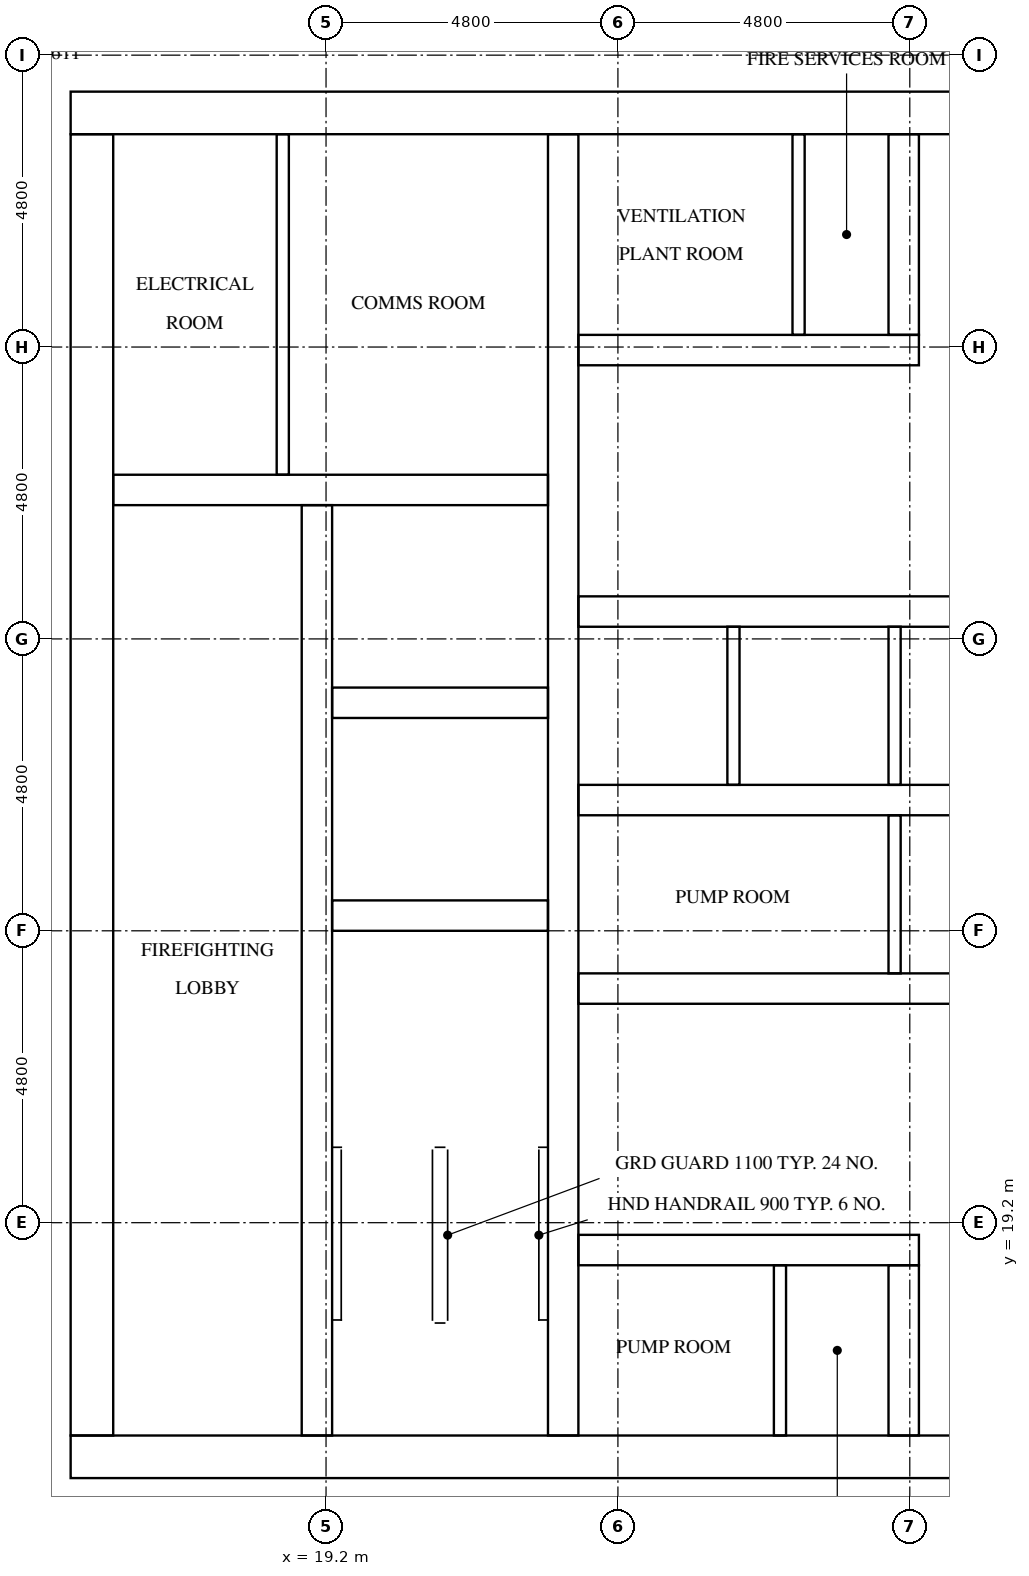
"""IFC4 building model, lengths in metres.
Left out: names, types, materials, properties, quantities, classifications, styles, units other than length and angle.
Written with IfcOpenShell. Run it as: python <this file> out.ifc"""

import sys

from ifc_helpers import new_model, si_unit, direction, frame, frame_2d, origin, place, context, subcontext, project, spatial, rectangle, extrude, element, fill, save


model = new_model("IFC4")
c1 = context("Model", 3, precision=1e-05, world=origin(), true_north=direction((0.0, 1.0)))
c2 = subcontext(c1, "Body", "Model", "MODEL_VIEW")
j1 = project(units=[si_unit("LENGTHUNIT", "METRE"), si_unit("PLANEANGLEUNIT", "RADIAN")], contexts=[c1])
p1 = place(None, origin())
s1 = spatial("IfcSite", under=j1, at=p1, CompositionType="ELEMENT")
p2 = place(p1, origin())
s2 = spatial("IfcBuilding", under=s1, at=p2, CompositionType="ELEMENT")
p3 = place(p2, frame((0.0, 0.0, 215.8)))
s3 = spatial("IfcBuildingStorey", under=s2, at=p3, CompositionType="ELEMENT", Elevation=215.8)
p4 = place(p3, frame((15.0, 15.35, 0.0), z_axis=(0.0, 0.0, 1.0), x_axis=(1.0, 0.0, 0.0)))
e1 = element("IfcWall", 1, at=p4, inside=s3, PredefinedType="SHEAR", context=c2, shape_type="SweptSolid", body=[
    extrude(rectangle(XDim=32.4, YDim=0.7, at=frame_2d((16.2, 0.0))), origin(), (0.0, 0.0, 1.0), 3.2),
])
p5 = place(p4, frame((15.3, 0.0, 0.0)))
e2 = element("IfcOpeningElement", 2, at=p5, cuts=e1, PredefinedType="OPENING", context=c2, shape_type="SweptSolid", body=[
    extrude(rectangle(XDim=1.8, YDim=2.1, at=frame_2d((0.9, 1.05))), frame((0.0, 0.36, 0.0), z_axis=(0.0, -1.0, 0.0), x_axis=(1.0, 0.0, 0.0)), (0.0, 0.0, 1.0), 0.72),
])
p6 = place(p3, frame((15.0, 37.45, 0.0), z_axis=(0.0, 0.0, 1.0), x_axis=(1.0, 0.0, 0.0)))
e3 = element("IfcWall", 3, at=p6, inside=s3, PredefinedType="SHEAR", context=c2, shape_type="SweptSolid", body=[
    extrude(rectangle(XDim=32.4, YDim=0.7, at=frame_2d((16.2, 0.0))), origin(), (0.0, 0.0, 1.0), 3.2),
])
p7 = place(p6, frame((15.3, 0.0, 0.0)))
e4 = element("IfcOpeningElement", 4, at=p7, cuts=e3, PredefinedType="OPENING", context=c2, shape_type="SweptSolid", body=[
    extrude(rectangle(XDim=1.8, YDim=2.1, at=frame_2d((0.9, 1.05))), frame((0.0, 0.36, 0.0), z_axis=(0.0, -1.0, 0.0), x_axis=(1.0, 0.0, 0.0)), (0.0, 0.0, 1.0), 0.72),
])
p8 = place(p6, frame((1.544, 0.0, 0.0)))
e5 = element("IfcOpeningElement", 5, at=p8, cuts=e3, PredefinedType="OPENING", context=c2, shape_type="SweptSolid", body=[
    extrude(rectangle(XDim=1.0, YDim=2.1, at=frame_2d((0.5, 1.05))), frame((0.0, 0.36, 0.0), z_axis=(0.0, -1.0, 0.0), x_axis=(1.0, 0.0, 0.0)), (0.0, 0.0, 1.0), 0.72),
])
p9 = place(p6, frame((5.219, 0.0, 0.0)))
e6 = element("IfcOpeningElement", 6, at=p9, cuts=e3, PredefinedType="OPENING", context=c2, shape_type="SweptSolid", body=[
    extrude(rectangle(XDim=1.0, YDim=2.1, at=frame_2d((0.5, 1.05))), frame((0.0, 0.36, 0.0), z_axis=(0.0, -1.0, 0.0), x_axis=(1.0, 0.0, 0.0)), (0.0, 0.0, 1.0), 0.72),
])
p10 = place(p3, frame((15.35, 15.7, 0.0), z_axis=(0.0, 0.0, 1.0), x_axis=(0.0, 1.0, 0.0)))
e7 = element("IfcWall", 7, at=p10, inside=s3, PredefinedType="SHEAR", context=c2, shape_type="SweptSolid", body=[
    extrude(rectangle(XDim=21.4, YDim=0.7, at=frame_2d((10.7, 0.0))), origin(), (0.0, 0.0, 1.0), 3.2),
])
p11 = place(p10, frame((5.06, 0.0, 0.0)))
e8 = element("IfcOpeningElement", 8, at=p11, cuts=e7, PredefinedType="OPENING", context=c2, shape_type="SweptSolid", body=[
    extrude(rectangle(XDim=1.2, YDim=2.1, at=frame_2d((0.6, 1.05))), frame((0.0, 0.36, 0.0), z_axis=(0.0, -1.0, 0.0), x_axis=(1.0, 0.0, 0.0)), (0.0, 0.0, 1.0), 0.72),
])
p12 = place(p3, frame((19.05, 15.7, 0.0), z_axis=(0.0, 0.0, 1.0), x_axis=(0.0, 1.0, 0.0)))
e9 = element("IfcWall", 9, at=p12, inside=s3, PredefinedType="SHEAR", context=c2, shape_type="SweptSolid", body=[
    extrude(rectangle(XDim=15.3, YDim=0.5, at=frame_2d((7.65, 0.0))), origin(), (0.0, 0.0, 1.0), 3.2),
])
p13 = place(p12, frame((9.75, 0.0, 0.0)))
e10 = element("IfcOpeningElement", 10, at=p13, cuts=e9, PredefinedType="OPENING", context=c2, shape_type="SweptSolid", body=[
    extrude(rectangle(XDim=1.1, YDim=2.1, at=frame_2d((0.55, 1.05))), frame((0.0, 0.26, 0.0), z_axis=(0.0, -1.0, 0.0), x_axis=(1.0, 0.0, 0.0)), (0.0, 0.0, 1.0), 0.52),
])
p14 = place(p12, frame((13.25, 0.0, 0.0)))
e11 = element("IfcOpeningElement", 11, at=p14, cuts=e9, PredefinedType="OPENING", context=c2, shape_type="SweptSolid", body=[
    extrude(rectangle(XDim=1.1, YDim=2.1, at=frame_2d((0.55, 1.05))), frame((0.0, 0.26, 0.0), z_axis=(0.0, -1.0, 0.0), x_axis=(1.0, 0.0, 0.0)), (0.0, 0.0, 1.0), 0.52),
])
p15 = place(p12, frame((0.5, 0.0, 0.0)))
e12 = element("IfcOpeningElement", 12, at=p15, cuts=e9, PredefinedType="OPENING", context=c2, shape_type="SweptSolid", body=[
    extrude(rectangle(XDim=1.2, YDim=2.1, at=frame_2d((0.6, 1.05))), frame((0.0, 0.26, 0.0), z_axis=(0.0, -1.0, 0.0), x_axis=(1.0, 0.0, 0.0)), (0.0, 0.0, 1.0), 0.52),
])
p16 = place(p3, frame((23.1, 15.7, 0.0), z_axis=(0.0, 0.0, 1.0), x_axis=(0.0, 1.0, 0.0)))
e13 = element("IfcWall", 13, at=p16, inside=s3, PredefinedType="SHEAR", context=c2, shape_type="SweptSolid", body=[
    extrude(rectangle(XDim=21.4, YDim=0.5, at=frame_2d((10.7, 0.0))), origin(), (0.0, 0.0, 1.0), 3.2),
])
for number, where, z_axis, x_axis in (
    (14, (19.3, 24.25, 0.0), (0.0, 0.0, 1.0), (1.0, 0.0, 0.0)),
    (15, (19.3, 27.75, 0.0), (0.0, 0.0, 1.0), (1.0, 0.0, 0.0)),
):
    element("IfcWall", number, at=place(p3, frame(where, z_axis=z_axis, x_axis=x_axis)), inside=s3, PredefinedType="SHEAR", context=c2, shape_type="SweptSolid", body=[
        extrude(rectangle(XDim=3.55, YDim=0.5, at=frame_2d((1.775, 0.0))), origin(), (0.0, 0.0, 1.0), 3.2),
    ])
p17 = place(p3, frame((15.7, 31.25, 0.0), z_axis=(0.0, 0.0, 1.0), x_axis=(1.0, 0.0, 0.0)))
e16 = element("IfcWall", 16, at=p17, inside=s3, PredefinedType="SHEAR", context=c2, shape_type="SweptSolid", body=[
    extrude(rectangle(XDim=7.15, YDim=0.5, at=frame_2d((3.575, 0.0))), origin(), (0.0, 0.0, 1.0), 3.2),
])
p18 = place(p3, frame((23.35, 18.75, 0.0), z_axis=(0.0, 0.0, 1.0), x_axis=(1.0, 0.0, 0.0)))
e17 = element("IfcWall", 17, at=p18, inside=s3, PredefinedType="SHEAR", context=c2, shape_type="SweptSolid", body=[
    extrude(rectangle(XDim=5.6, YDim=0.5, at=frame_2d((2.8, 0.0))), origin(), (0.0, 0.0, 1.0), 3.2),
])
p19 = place(p18, frame((1.107, 0.0, 0.0)))
e18 = element("IfcOpeningElement", 18, at=p19, cuts=e17, PredefinedType="OPENING", context=c2, shape_type="SweptSolid", body=[
    extrude(rectangle(XDim=1.0, YDim=2.1, at=frame_2d((0.5, 1.05))), frame((0.0, 0.26, 0.0), z_axis=(0.0, -1.0, 0.0), x_axis=(1.0, 0.0, 0.0)), (0.0, 0.0, 1.0), 0.52),
])
p20 = place(p18, frame((3.758, 0.0, 0.0)))
e19 = element("IfcOpeningElement", 19, at=p20, cuts=e17, PredefinedType="OPENING", context=c2, shape_type="SweptSolid", body=[
    extrude(rectangle(XDim=1.0, YDim=2.1, at=frame_2d((0.5, 1.05))), frame((0.0, 0.26, 0.0), z_axis=(0.0, -1.0, 0.0), x_axis=(1.0, 0.0, 0.0)), (0.0, 0.0, 1.0), 0.52),
])
p21 = place(p3, frame((23.35, 23.05, 0.0), z_axis=(0.0, 0.0, 1.0), x_axis=(1.0, 0.0, 0.0)))
e20 = element("IfcWall", 20, at=p21, inside=s3, PredefinedType="SHEAR", context=c2, shape_type="SweptSolid", body=[
    extrude(rectangle(XDim=15.7, YDim=0.5, at=frame_2d((7.85, 0.0))), origin(), (0.0, 0.0, 1.0), 3.2),
])
p22 = place(p21, frame((2.05, 0.0, 0.0)))
e21 = element("IfcOpeningElement", 21, at=p22, cuts=e20, PredefinedType="OPENING", context=c2, shape_type="SweptSolid", body=[
    extrude(rectangle(XDim=1.0, YDim=2.1, at=frame_2d((0.5, 1.05))), frame((0.0, 0.26, 0.0), z_axis=(0.0, -1.0, 0.0), x_axis=(1.0, 0.0, 0.0)), (0.0, 0.0, 1.0), 0.52),
])
p23 = place(p21, frame((11.784, 0.0, 0.0)))
e22 = element("IfcOpeningElement", 22, at=p23, cuts=e20, PredefinedType="OPENING", context=c2, shape_type="SweptSolid", body=[
    extrude(rectangle(XDim=1.0, YDim=2.1, at=frame_2d((0.5, 1.05))), frame((0.0, 0.26, 0.0), z_axis=(0.0, -1.0, 0.0), x_axis=(1.0, 0.0, 0.0)), (0.0, 0.0, 1.0), 0.52),
])
p24 = place(p21, frame((14.434, 0.0, 0.0)))
e23 = element("IfcOpeningElement", 23, at=p24, cuts=e20, PredefinedType="OPENING", context=c2, shape_type="SweptSolid", body=[
    extrude(rectangle(XDim=1.0, YDim=2.1, at=frame_2d((0.5, 1.05))), frame((0.0, 0.26, 0.0), z_axis=(0.0, -1.0, 0.0), x_axis=(1.0, 0.0, 0.0)), (0.0, 0.0, 1.0), 0.52),
])
p25 = place(p3, frame((23.35, 26.15, 0.0), z_axis=(0.0, 0.0, 1.0), x_axis=(1.0, 0.0, 0.0)))
e24 = element("IfcWall", 24, at=p25, inside=s3, PredefinedType="SHEAR", context=c2, shape_type="SweptSolid", body=[
    extrude(rectangle(XDim=15.7, YDim=0.5, at=frame_2d((7.85, 0.0))), origin(), (0.0, 0.0, 1.0), 3.2),
])
p26 = place(p3, frame((23.35, 29.25, 0.0), z_axis=(0.0, 0.0, 1.0), x_axis=(1.0, 0.0, 0.0)))
e25 = element("IfcWall", 25, at=p26, inside=s3, PredefinedType="SHEAR", context=c2, shape_type="SweptSolid", body=[
    extrude(rectangle(XDim=15.7, YDim=0.5, at=frame_2d((7.85, 0.0))), origin(), (0.0, 0.0, 1.0), 3.2),
])
p27 = place(p26, frame((0.675, 0.0, 0.0)))
e26 = element("IfcOpeningElement", 26, at=p27, cuts=e25, PredefinedType="OPENING", context=c2, shape_type="SweptSolid", body=[
    extrude(rectangle(XDim=1.1, YDim=2.1, at=frame_2d((0.55, 1.05))), frame((0.0, 0.26, 0.0), z_axis=(0.0, -1.0, 0.0), x_axis=(1.0, 0.0, 0.0)), (0.0, 0.0, 1.0), 0.52),
])
p28 = place(p26, frame((3.325, 0.0, 0.0)))
e27 = element("IfcOpeningElement", 27, at=p28, cuts=e25, PredefinedType="OPENING", context=c2, shape_type="SweptSolid", body=[
    extrude(rectangle(XDim=1.1, YDim=2.1, at=frame_2d((0.55, 1.05))), frame((0.0, 0.26, 0.0), z_axis=(0.0, -1.0, 0.0), x_axis=(1.0, 0.0, 0.0)), (0.0, 0.0, 1.0), 0.52),
])
p29 = place(p26, frame((5.975, 0.0, 0.0)))
e28 = element("IfcOpeningElement", 28, at=p29, cuts=e25, PredefinedType="OPENING", context=c2, shape_type="SweptSolid", body=[
    extrude(rectangle(XDim=1.1, YDim=2.1, at=frame_2d((0.55, 1.05))), frame((0.0, 0.26, 0.0), z_axis=(0.0, -1.0, 0.0), x_axis=(1.0, 0.0, 0.0)), (0.0, 0.0, 1.0), 0.52),
])
p30 = place(p26, frame((8.625, 0.0, 0.0)))
e29 = element("IfcOpeningElement", 29, at=p30, cuts=e25, PredefinedType="OPENING", context=c2, shape_type="SweptSolid", body=[
    extrude(rectangle(XDim=1.1, YDim=2.1, at=frame_2d((0.55, 1.05))), frame((0.0, 0.26, 0.0), z_axis=(0.0, -1.0, 0.0), x_axis=(1.0, 0.0, 0.0)), (0.0, 0.0, 1.0), 0.52),
])
p31 = place(p26, frame((11.275, 0.0, 0.0)))
e30 = element("IfcOpeningElement", 30, at=p31, cuts=e25, PredefinedType="OPENING", context=c2, shape_type="SweptSolid", body=[
    extrude(rectangle(XDim=1.1, YDim=2.1, at=frame_2d((0.55, 1.05))), frame((0.0, 0.26, 0.0), z_axis=(0.0, -1.0, 0.0), x_axis=(1.0, 0.0, 0.0)), (0.0, 0.0, 1.0), 0.52),
])
p32 = place(p26, frame((13.925, 0.0, 0.0)))
e31 = element("IfcOpeningElement", 31, at=p32, cuts=e25, PredefinedType="OPENING", context=c2, shape_type="SweptSolid", body=[
    extrude(rectangle(XDim=1.1, YDim=2.1, at=frame_2d((0.55, 1.05))), frame((0.0, 0.26, 0.0), z_axis=(0.0, -1.0, 0.0), x_axis=(1.0, 0.0, 0.0)), (0.0, 0.0, 1.0), 0.52),
])
p33 = place(p3, frame((23.35, 33.55, 0.0), z_axis=(0.0, 0.0, 1.0), x_axis=(1.0, 0.0, 0.0)))
e32 = element("IfcWall", 32, at=p33, inside=s3, PredefinedType="SHEAR", context=c2, shape_type="SweptSolid", body=[
    extrude(rectangle(XDim=5.6, YDim=0.5, at=frame_2d((2.8, 0.0))), origin(), (0.0, 0.0, 1.0), 3.2),
])
p34 = place(p33, frame((1.26, 0.0, 0.0)))
e33 = element("IfcOpeningElement", 33, at=p34, cuts=e32, PredefinedType="OPENING", context=c2, shape_type="SweptSolid", body=[
    extrude(rectangle(XDim=1.0, YDim=2.1, at=frame_2d((0.5, 1.05))), frame((0.0, 0.26, 0.0), z_axis=(0.0, -1.0, 0.0), x_axis=(1.0, 0.0, 0.0)), (0.0, 0.0, 1.0), 0.52),
])
p35 = place(p33, frame((3.91, 0.0, 0.0)))
e34 = element("IfcOpeningElement", 34, at=p35, cuts=e32, PredefinedType="OPENING", context=c2, shape_type="SweptSolid", body=[
    extrude(rectangle(XDim=1.0, YDim=2.1, at=frame_2d((0.5, 1.05))), frame((0.0, 0.26, 0.0), z_axis=(0.0, -1.0, 0.0), x_axis=(1.0, 0.0, 0.0)), (0.0, 0.0, 1.0), 0.52),
])
p36 = place(p3, frame((28.7, 15.7, 0.0), z_axis=(0.0, 0.0, 1.0), x_axis=(0.0, 1.0, 0.0)))
e35 = element("IfcWall", 35, at=p36, inside=s3, PredefinedType="SHEAR", context=c2, shape_type="SweptSolid", body=[
    extrude(rectangle(XDim=2.8, YDim=0.5, at=frame_2d((1.4, 0.0))), origin(), (0.0, 0.0, 1.0), 3.2),
])
p37 = place(p3, frame((28.7, 33.8, 0.0), z_axis=(0.0, 0.0, 1.0), x_axis=(0.0, 1.0, 0.0)))
e36 = element("IfcWall", 36, at=p37, inside=s3, PredefinedType="SHEAR", context=c2, shape_type="SweptSolid", body=[
    extrude(rectangle(XDim=3.3, YDim=0.5, at=frame_2d((1.65, 0.0))), origin(), (0.0, 0.0, 1.0), 3.2),
])
p38 = place(p3, frame((25.9, 26.4, 0.0), z_axis=(0.0, 0.0, 1.0), x_axis=(0.0, 1.0, 0.0)))
e37 = element("IfcWall", 37, at=p38, inside=s3, PredefinedType="SOLIDWALL", context=c2, shape_type="SweptSolid", body=[
    extrude(rectangle(XDim=2.6, YDim=0.2, at=frame_2d((1.3, 0.0))), origin(), (0.0, 0.0, 1.0), 3.2),
])
p39 = place(p3, frame((28.55, 23.3, 0.0), z_axis=(0.0, 0.0, 1.0), x_axis=(0.0, 1.0, 0.0)))
e38 = element("IfcWall", 38, at=p39, inside=s3, PredefinedType="SOLIDWALL", context=c2, shape_type="SweptSolid", body=[
    extrude(rectangle(XDim=2.6, YDim=0.2, at=frame_2d((1.3, 0.0))), origin(), (0.0, 0.0, 1.0), 3.2),
])
p40 = place(p3, frame((28.55, 26.4, 0.0), z_axis=(0.0, 0.0, 1.0), x_axis=(0.0, 1.0, 0.0)))
e39 = element("IfcWall", 39, at=p40, inside=s3, PredefinedType="SOLIDWALL", context=c2, shape_type="SweptSolid", body=[
    extrude(rectangle(XDim=2.6, YDim=0.2, at=frame_2d((1.3, 0.0))), origin(), (0.0, 0.0, 1.0), 3.2),
])
p41 = place(p3, frame((18.489, 31.5, 0.0), z_axis=(0.0, 0.0, 1.0), x_axis=(0.0, 1.0, 0.0)))
e40 = element("IfcWall", 40, at=p41, inside=s3, PredefinedType="PARTITIONING", context=c2, shape_type="SweptSolid", body=[
    extrude(rectangle(XDim=5.6, YDim=0.2, at=frame_2d((2.8, 0.0))), origin(), (0.0, 0.0, 1.0), 3.2),
])
p42 = place(p3, frame((26.665, 15.7, 0.0), z_axis=(0.0, 0.0, 1.0), x_axis=(0.0, 1.0, 0.0)))
e41 = element("IfcWall", 41, at=p42, inside=s3, PredefinedType="PARTITIONING", context=c2, shape_type="SweptSolid", body=[
    extrude(rectangle(XDim=2.8, YDim=0.2, at=frame_2d((1.4, 0.0))), origin(), (0.0, 0.0, 1.0), 3.2),
])
p43 = place(p3, frame((26.971, 33.8, 0.0), z_axis=(0.0, 0.0, 1.0), x_axis=(0.0, 1.0, 0.0)))
e42 = element("IfcWall", 42, at=p43, inside=s3, PredefinedType="PARTITIONING", context=c2, shape_type="SweptSolid", body=[
    extrude(rectangle(XDim=3.3, YDim=0.2, at=frame_2d((1.65, 0.0))), origin(), (0.0, 0.0, 1.0), 3.2),
])
p44 = place(p27, origin())
e43 = element("IfcDoor", 43, at=p44, inside=s3, OperationType="DOUBLE_DOOR_SLIDING", PredefinedType="DOOR", context=c2, shape_type="SweptSolid", body=[
    extrude(rectangle(XDim=1.1, YDim=2.1, at=frame_2d((0.55, 1.05))), frame((0.0, 0.025, 0.0), z_axis=(0.0, -1.0, 0.0), x_axis=(1.0, 0.0, 0.0)), (0.0, 0.0, 1.0), 0.05),
])
fill(e26, e43)
p45 = place(p28, origin())
e44 = element("IfcDoor", 44, at=p45, inside=s3, OperationType="DOUBLE_DOOR_SLIDING", PredefinedType="DOOR", context=c2, shape_type="SweptSolid", body=[
    extrude(rectangle(XDim=1.1, YDim=2.1, at=frame_2d((0.55, 1.05))), frame((0.0, 0.025, 0.0), z_axis=(0.0, -1.0, 0.0), x_axis=(1.0, 0.0, 0.0)), (0.0, 0.0, 1.0), 0.05),
])
fill(e27, e44)
p46 = place(p29, origin())
e45 = element("IfcDoor", 45, at=p46, inside=s3, OperationType="DOUBLE_DOOR_SLIDING", PredefinedType="DOOR", context=c2, shape_type="SweptSolid", body=[
    extrude(rectangle(XDim=1.1, YDim=2.1, at=frame_2d((0.55, 1.05))), frame((0.0, 0.025, 0.0), z_axis=(0.0, -1.0, 0.0), x_axis=(1.0, 0.0, 0.0)), (0.0, 0.0, 1.0), 0.05),
])
fill(e28, e45)
p47 = place(p13, origin())
e46 = element("IfcDoor", 46, at=p47, inside=s3, OperationType="DOUBLE_DOOR_SLIDING", PredefinedType="DOOR", context=c2, shape_type="SweptSolid", body=[
    extrude(rectangle(XDim=1.1, YDim=2.1, at=frame_2d((0.55, 1.05))), frame((0.0, 0.025, 0.0), z_axis=(0.0, -1.0, 0.0), x_axis=(1.0, 0.0, 0.0)), (0.0, 0.0, 1.0), 0.05),
])
fill(e10, e46)
p48 = place(p14, origin())
e47 = element("IfcDoor", 47, at=p48, inside=s3, OperationType="DOUBLE_DOOR_SLIDING", PredefinedType="DOOR", context=c2, shape_type="SweptSolid", body=[
    extrude(rectangle(XDim=1.1, YDim=2.1, at=frame_2d((0.55, 1.05))), frame((0.0, 0.025, 0.0), z_axis=(0.0, -1.0, 0.0), x_axis=(1.0, 0.0, 0.0)), (0.0, 0.0, 1.0), 0.05),
])
fill(e11, e47)
p49 = place(p15, frame((1.2, 0.0, 0.0), z_axis=(0.0, 0.0, 1.0), x_axis=(-1.0, 0.0, 0.0)))
e48 = element("IfcDoor", 48, at=p49, inside=s3, OperationType="SINGLE_SWING_RIGHT", PredefinedType="DOOR", context=c2, shape_type="SweptSolid", body=[
    extrude(rectangle(XDim=1.2, YDim=2.1, at=frame_2d((0.6, 1.05))), frame((0.0, 0.025, 0.0), z_axis=(0.0, -1.0, 0.0), x_axis=(1.0, 0.0, 0.0)), (0.0, 0.0, 1.0), 0.05),
])
fill(e12, e48)
p50 = place(p11, frame((1.2, 0.0, 0.0), z_axis=(0.0, 0.0, 1.0), x_axis=(-1.0, 0.0, 0.0)))
e49 = element("IfcDoor", 49, at=p50, inside=s3, OperationType="SINGLE_SWING_LEFT", PredefinedType="DOOR", context=c2, shape_type="SweptSolid", body=[
    extrude(rectangle(XDim=1.2, YDim=2.1, at=frame_2d((0.6, 1.05))), frame((0.0, 0.025, 0.0), z_axis=(0.0, -1.0, 0.0), x_axis=(1.0, 0.0, 0.0)), (0.0, 0.0, 1.0), 0.05),
])
fill(e8, e49)
p51 = place(p8, origin())
e50 = element("IfcDoor", 50, at=p51, inside=s3, OperationType="SINGLE_SWING_LEFT", PredefinedType="DOOR", context=c2, shape_type="SweptSolid", body=[
    extrude(rectangle(XDim=1.0, YDim=2.1, at=frame_2d((0.5, 1.05))), frame((0.0, 0.025, 0.0), z_axis=(0.0, -1.0, 0.0), x_axis=(1.0, 0.0, 0.0)), (0.0, 0.0, 1.0), 0.05),
])
fill(e5, e50)
p52 = place(p9, origin())
e51 = element("IfcDoor", 51, at=p52, inside=s3, OperationType="SINGLE_SWING_RIGHT", PredefinedType="DOOR", context=c2, shape_type="SweptSolid", body=[
    extrude(rectangle(XDim=1.0, YDim=2.1, at=frame_2d((0.5, 1.05))), frame((0.0, 0.025, 0.0), z_axis=(0.0, -1.0, 0.0), x_axis=(1.0, 0.0, 0.0)), (0.0, 0.0, 1.0), 0.05),
])
fill(e6, e51)
p53 = place(p22, frame((1.0, 0.0, 0.0), z_axis=(0.0, 0.0, 1.0), x_axis=(-1.0, 0.0, 0.0)))
e52 = element("IfcDoor", 52, at=p53, inside=s3, OperationType="SINGLE_SWING_LEFT", PredefinedType="DOOR", context=c2, shape_type="SweptSolid", body=[
    extrude(rectangle(XDim=1.0, YDim=2.1, at=frame_2d((0.5, 1.05))), frame((0.0, 0.025, 0.0), z_axis=(0.0, -1.0, 0.0), x_axis=(1.0, 0.0, 0.0)), (0.0, 0.0, 1.0), 0.05),
])
fill(e21, e52)
p54 = place(p19, origin())
e53 = element("IfcDoor", 53, at=p54, inside=s3, OperationType="SINGLE_SWING_RIGHT", PredefinedType="DOOR", context=c2, shape_type="SweptSolid", body=[
    extrude(rectangle(XDim=1.0, YDim=2.1, at=frame_2d((0.5, 1.05))), frame((0.0, 0.025, 0.0), z_axis=(0.0, -1.0, 0.0), x_axis=(1.0, 0.0, 0.0)), (0.0, 0.0, 1.0), 0.05),
])
fill(e18, e53)
p55 = place(p20, origin())
e54 = element("IfcDoor", 54, at=p55, inside=s3, OperationType="SINGLE_SWING_LEFT", PredefinedType="DOOR", context=c2, shape_type="SweptSolid", body=[
    extrude(rectangle(XDim=1.0, YDim=2.1, at=frame_2d((0.5, 1.05))), frame((0.0, 0.025, 0.0), z_axis=(0.0, -1.0, 0.0), x_axis=(1.0, 0.0, 0.0)), (0.0, 0.0, 1.0), 0.05),
])
fill(e19, e54)
p56 = place(p34, frame((1.0, 0.0, 0.0), z_axis=(0.0, 0.0, 1.0), x_axis=(-1.0, 0.0, 0.0)))
e55 = element("IfcDoor", 55, at=p56, inside=s3, OperationType="SINGLE_SWING_RIGHT", PredefinedType="DOOR", context=c2, shape_type="SweptSolid", body=[
    extrude(rectangle(XDim=1.0, YDim=2.1, at=frame_2d((0.5, 1.05))), frame((0.0, 0.025, 0.0), z_axis=(0.0, -1.0, 0.0), x_axis=(1.0, 0.0, 0.0)), (0.0, 0.0, 1.0), 0.05),
])
fill(e33, e55)
p57 = place(p35, frame((1.0, 0.0, 0.0), z_axis=(0.0, 0.0, 1.0), x_axis=(-1.0, 0.0, 0.0)))
e56 = element("IfcDoor", 56, at=p57, inside=s3, OperationType="SINGLE_SWING_LEFT", PredefinedType="DOOR", context=c2, shape_type="SweptSolid", body=[
    extrude(rectangle(XDim=1.0, YDim=2.1, at=frame_2d((0.5, 1.05))), frame((0.0, 0.025, 0.0), z_axis=(0.0, -1.0, 0.0), x_axis=(1.0, 0.0, 0.0)), (0.0, 0.0, 1.0), 0.05),
])
fill(e34, e56)
save(model, sys.argv[1])
